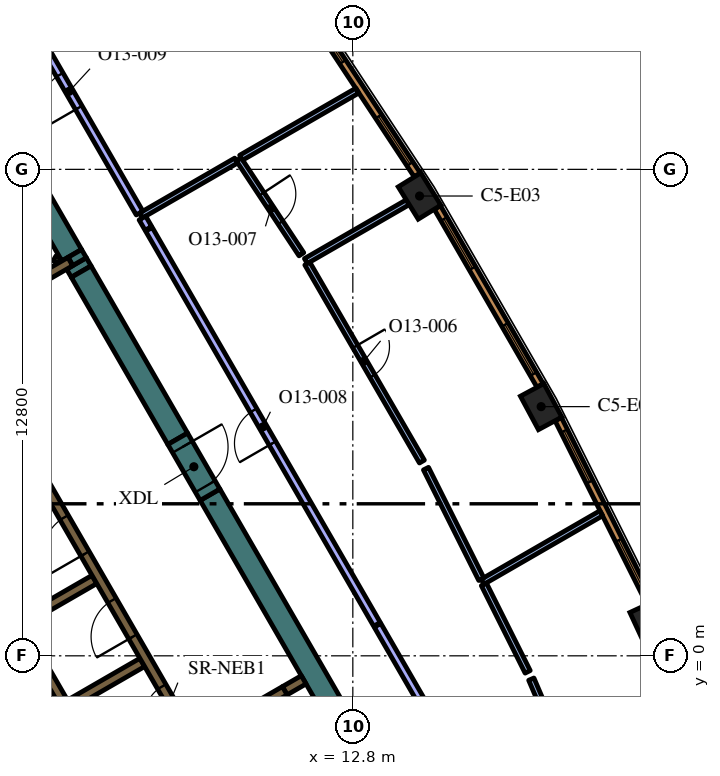
"""IFC4 building model, lengths in metres.
Left out: names, types, materials, properties, quantities, classifications, styles, units other than length and angle.
Written with IfcOpenShell. Run it as: python <this file> out.ifc"""

import sys

from ifc_helpers import new_model, si_unit, direction, frame, frame_2d, origin, origin_2d, place, context, subcontext, project, spatial, polyline, rectangle, outline, extrude, element, fill, save


model = new_model("IFC4")
c1 = context("Model", 3, precision=1e-05, world=origin(), true_north=direction((0.0, 1.0)))
c2 = subcontext(c1, "Body", "Model", "MODEL_VIEW")
j1 = project(units=[si_unit("LENGTHUNIT", "METRE"), si_unit("PLANEANGLEUNIT", "RADIAN")], contexts=[c1])
p1 = place(None, origin())
s1 = spatial("IfcSite", under=j1, at=p1, CompositionType="ELEMENT")
p2 = place(p1, origin())
s2 = spatial("IfcBuilding", under=s1, at=p2, CompositionType="ELEMENT")
p3 = place(p2, frame((0.0, 0.0, 300.6)))
s3 = spatial("IfcBuildingStorey", under=s2, at=p3, CompositionType="ELEMENT", Elevation=300.6)
for number, where, z_axis, x_axis in (
    (1, (20.619, 0.834, 0.0), (0.0, 0.0, 1.0), (-0.421, 0.907, 0.0)),
    (2, (17.756, 6.557, 0.0), (0.0, 0.0, 1.0), (-0.474, 0.881, 0.0)),
    (3, (14.556, 12.098, 0.0), (0.0, 0.0, 1.0), (-0.526, 0.851, 0.0)),
):
    element("IfcColumn", number, at=place(p3, frame(where, z_axis=z_axis, x_axis=x_axis)), inside=s3, PredefinedType="COLUMN", context=c2, shape_type="SweptSolid", body=[
        extrude(rectangle(XDim=1.0, YDim=0.7, at=origin_2d()), origin(), (0.0, 0.0, 1.0), 4.2),
    ])
p4 = place(p3, frame((9.042, 4.239, 0.0), z_axis=(0.0, 0.0, 1.0), x_axis=(0.500005785455, -0.866022063525, 0.0)))
e4 = element("IfcWall", 4, at=p4, inside=s3, PredefinedType="SOLIDWALL", context=c2, shape_type="SweptSolid", body=[
    extrude(rectangle(XDim=12.406, YDim=0.6, at=frame_2d((6.203, 0.0))), origin(), (0.0, 0.0, 1.0), 4.2),
])
p5 = place(p3, frame((5.529, 10.324, 0.0), z_axis=(0.0, 0.0, 1.0), x_axis=(0.499122205112, -0.866531606097, 0.0)))
e5 = element("IfcWall", 5, at=p5, inside=s3, PredefinedType="SOLIDWALL", context=c2, shape_type="SweptSolid", body=[
    extrude(rectangle(XDim=0.247, YDim=0.6, at=frame_2d((0.123, 0.0))), origin(), (0.0, 0.0, 1.0), 4.2),
])
p6 = place(p3, frame((1.989, 16.456, 0.0), z_axis=(0.0, 0.0, 1.0), x_axis=(0.499973159588, -0.866040899549, 0.0)))
e6 = element("IfcWall", 6, at=p6, inside=s3, PredefinedType="SOLIDWALL", context=c2, shape_type="SweptSolid", body=[
    extrude(rectangle(XDim=6.828, YDim=0.6, at=frame_2d((3.414, 0.0))), origin(), (0.0, 0.0, 1.0), 4.2),
])
p7 = place(p3, origin())
e7 = element("IfcWall", 7, at=p7, inside=s3, PredefinedType="SOLIDWALL", context=c2, shape_type="SweptSolid", body=[
    extrude(outline(polyline([(5.664, 10.691), (5.788, 10.476), (5.432, 10.271), (5.308, 10.486), (5.664, 10.691)])), origin(), (0.0, 0.0, 1.0), 4.2),
])
p8 = place(p3, frame((8.192, 5.711, 0.0), z_axis=(0.0, 0.0, 1.0), x_axis=(-0.500006836656, 0.866021456604, 0.0)))
e8 = element("IfcWall", 8, at=p8, inside=s3, PredefinedType="SOLIDWALL", context=c2, shape_type="SweptSolid", body=[
    extrude(rectangle(XDim=5.078, YDim=0.6, at=frame_2d((2.539, 0.0))), origin(), (0.0, 0.0, 1.0), 4.2),
])
p9 = place(p3, frame((11.507, -0.631, 0.0), z_axis=(0.0, 0.0, 1.0), x_axis=(-0.866093731455, -0.499881634324, 0.0)))
e9 = element("IfcWall", 9, at=p9, inside=s3, PredefinedType="SOLIDWALL", context=c2, shape_type="SweptSolid", body=[
    extrude(rectangle(XDim=0.575, YDim=0.25, at=frame_2d((0.288, 0.0))), origin(), (0.0, 0.0, 1.0), 4.2),
])
p10 = place(p3, frame((5.97, -2.591, 0.0), z_axis=(0.0, 0.0, 1.0), x_axis=(-0.499994469932, 0.866028596547, 0.0)))
e10 = element("IfcWall", 10, at=p10, inside=s3, PredefinedType="SOLIDWALL", context=c2, shape_type="SweptSolid", body=[
    extrude(rectangle(XDim=10.488, YDim=0.25, at=frame_2d((5.244, 0.0))), origin(), (0.0, 0.0, 1.0), 4.2),
])
for number, where, z_axis, x_axis in (
    (11, (4.094, 0.909, 0.0), (0.0, 0.0, 1.0), (0.866, 0.5, 0.0)),
    (12, (5.354, -1.274, 0.0), (0.0, 0.0, 1.0), (0.866, 0.5, 0.0)),
):
    element("IfcWall", number, at=place(p3, frame(where, z_axis=z_axis, x_axis=x_axis)), inside=s3, PredefinedType="SOLIDWALL", context=c2, shape_type="SweptSolid", body=[
        extrude(rectangle(XDim=2.2, YDim=0.25, at=frame_2d((1.1, 0.0))), origin(), (0.0, 0.0, 1.0), 4.2),
    ])
p11 = place(p3, frame((4.98, 10.358, 0.0), z_axis=(0.0, 0.0, 1.0), x_axis=(0.500640202437, 0.86565546709, 0.0)))
e13 = element("IfcWall", 13, at=p11, inside=s3, PredefinedType="PARTITIONING", context=c2, shape_type="SweptSolid", body=[
    extrude(rectangle(XDim=0.146, YDim=0.15, at=frame_2d((0.073, 0.0))), origin(), (0.0, 0.0, 1.0), 3.55),
])
p12 = place(p3, frame((8.565, -2.185, 0.0), z_axis=(0.0, 0.0, 1.0), x_axis=(-0.499997954832, 0.866026584559, 0.0)))
e14 = element("IfcWall", 14, at=p12, inside=s3, PredefinedType="SOLIDWALL", context=c2, shape_type="SweptSolid", body=[
    extrude(rectangle(XDim=12.35, YDim=0.25, at=frame_2d((6.175, 0.0))), origin(), (0.0, 0.0, 1.0), 4.2),
])
p13 = place(p12, frame((0.685, 0.0, 0.0)))
e15 = element("IfcOpeningElement", 15, at=p13, cuts=e14, PredefinedType="OPENING", context=c2, shape_type="SweptSolid", body=[
    extrude(rectangle(XDim=0.9, YDim=2.1, at=frame_2d((0.45, 1.05))), frame((0.0, 0.135, 0.0), z_axis=(0.0, -1.0, 0.0), x_axis=(1.0, 0.0, 0.0)), (0.0, 0.0, 1.0), 0.27),
])
p14 = place(p12, frame((3.105, 0.0, 0.0)))
e16 = element("IfcOpeningElement", 16, at=p14, cuts=e14, PredefinedType="OPENING", context=c2, shape_type="SweptSolid", body=[
    extrude(rectangle(XDim=1.1, YDim=2.1, at=frame_2d((0.55, 1.05))), frame((0.0, 0.135, 0.0), z_axis=(0.0, -1.0, 0.0), x_axis=(1.0, 0.0, 0.0)), (0.0, 0.0, 1.0), 0.27),
])
p15 = place(p12, frame((5.625, 0.0, 0.0)))
e17 = element("IfcOpeningElement", 17, at=p15, cuts=e14, PredefinedType="OPENING", context=c2, shape_type="SweptSolid", body=[
    extrude(rectangle(XDim=1.1, YDim=2.1, at=frame_2d((0.55, 1.05))), frame((0.0, 0.135, 0.0), z_axis=(0.0, -1.0, 0.0), x_axis=(1.0, 0.0, 0.0)), (0.0, 0.0, 1.0), 0.27),
])
p16 = place(p12, frame((8.145, 0.0, 0.0)))
e18 = element("IfcOpeningElement", 18, at=p16, cuts=e14, PredefinedType="OPENING", context=c2, shape_type="SweptSolid", body=[
    extrude(rectangle(XDim=1.1, YDim=2.1, at=frame_2d((0.55, 1.05))), frame((0.0, 0.135, 0.0), z_axis=(0.0, -1.0, 0.0), x_axis=(1.0, 0.0, 0.0)), (0.0, 0.0, 1.0), 0.27),
])
p17 = place(p12, frame((10.665, 0.0, 0.0)))
e19 = element("IfcOpeningElement", 19, at=p17, cuts=e14, PredefinedType="OPENING", context=c2, shape_type="SweptSolid", body=[
    extrude(rectangle(XDim=1.1, YDim=2.1, at=frame_2d((0.55, 1.05))), frame((0.0, 0.135, 0.0), z_axis=(0.0, -1.0, 0.0), x_axis=(1.0, 0.0, 0.0)), (0.0, 0.0, 1.0), 0.27),
])
p18 = place(p3, frame((5.366, 10.373, 0.0), z_axis=(0.0, 0.0, 1.0), x_axis=(-0.866019956843, -0.50000943426, 0.0)))
e20 = element("IfcWall", 20, at=p18, inside=s3, PredefinedType="SOLIDWALL", context=c2, shape_type="SweptSolid", body=[
    extrude(rectangle(XDim=2.7, YDim=0.25, at=frame_2d((1.35, 0.0))), origin(), (0.0, 0.0, 1.0), 4.2),
])
p19 = place(p18, frame((1.45, 0.0, 0.0)))
e21 = element("IfcOpeningElement", 21, at=p19, cuts=e20, PredefinedType="OPENING", context=c2, shape_type="SweptSolid", body=[
    extrude(rectangle(XDim=0.9, YDim=2.1, at=frame_2d((0.45, 1.05))), frame((0.0, 0.135, 0.0), z_axis=(0.0, -1.0, 0.0), x_axis=(1.0, 0.0, 0.0)), (0.0, 0.0, 1.0), 0.27),
])
p20 = place(p3, frame((11.009, -0.919, 0.0), z_axis=(0.0, 0.0, 1.0), x_axis=(-0.866059744384, -0.49994051562, 0.0)))
e22 = element("IfcWall", 22, at=p20, inside=s3, PredefinedType="SOLIDWALL", context=c2, shape_type="SweptSolid", body=[
    extrude(rectangle(XDim=2.1, YDim=0.25, at=frame_2d((1.05, 0.0))), origin(), (0.0, 0.0, 1.0), 4.2),
])
p21 = place(p20, frame((0.45, 0.0, 0.0)))
e23 = element("IfcOpeningElement", 23, at=p21, cuts=e22, PredefinedType="OPENING", context=c2, shape_type="SweptSolid", body=[
    extrude(rectangle(XDim=1.2, YDim=2.1, at=frame_2d((0.6, 1.05))), frame((0.0, 0.135, 0.0), z_axis=(0.0, -1.0, 0.0), x_axis=(1.0, 0.0, 0.0)), (0.0, 0.0, 1.0), 0.27),
])
p22 = place(p3, frame((8.192, 5.711, 0.0), z_axis=(0.0, 0.0, 1.0), x_axis=(0.500062241894, -0.865989465428, 0.0)))
e24 = element("IfcWall", 24, at=p22, inside=s3, PredefinedType="SOLIDWALL", context=c2, shape_type="SweptSolid", body=[
    extrude(rectangle(XDim=1.7, YDim=0.6, at=frame_2d((0.85, 0.0))), origin(), (0.0, 0.0, 1.0), 4.2),
])
p23 = place(p22, frame((0.25, 0.0, 0.0)))
e25 = element("IfcOpeningElement", 25, at=p23, cuts=e24, PredefinedType="OPENING", context=c2, shape_type="SweptSolid", body=[
    extrude(rectangle(XDim=1.2, YDim=2.1, at=frame_2d((0.6, 1.05))), frame((0.0, 0.31, 0.0), z_axis=(0.0, -1.0, 0.0), x_axis=(1.0, 0.0, 0.0)), (0.0, 0.0, 1.0), 0.62),
])
p24 = place(p3, frame((16.215, 1.948, 0.0), z_axis=(0.0, 0.0, 1.0), x_axis=(0.866026634742, 0.499997867913, 0.0)))
e26 = element("IfcWall", 26, at=p24, inside=s3, PredefinedType="PARTITIONING", context=c2, shape_type="SweptSolid", body=[
    extrude(rectangle(XDim=3.606, YDim=0.15, at=frame_2d((1.803, 0.0))), origin(), (0.0, 0.0, 1.0), 3.55),
])
p25 = place(p3, frame((17.497, -0.613, 0.0), z_axis=(0.0, 0.0, 1.0), x_axis=(0.393381340755, -0.919375397075, 0.0)))
e27 = element("IfcWall", 27, at=p25, inside=s3, PredefinedType="PARTITIONING", context=c2, shape_type="SweptSolid", body=[
    extrude(rectangle(XDim=5.368, YDim=0.15, at=frame_2d((2.684, 0.0))), origin(), (0.0, 0.0, 1.0), 3.55),
])
p26 = place(p25, frame((2.268, 0.0, 0.0)))
e28 = element("IfcOpeningElement", 28, at=p26, cuts=e27, PredefinedType="OPENING", context=c2, shape_type="SweptSolid", body=[
    extrude(rectangle(XDim=0.9, YDim=2.1, at=frame_2d((0.45, 1.05))), frame((0.0, 0.085, 0.0), z_axis=(0.0, -1.0, 0.0), x_axis=(1.0, 0.0, 0.0)), (0.0, 0.0, 1.0), 0.17),
])
p27 = place(p3, frame((17.401, -0.422, 0.0), z_axis=(0.0, 0.0, 1.0), x_axis=(-0.447479029466, 0.894294424778, 0.0)))
e29 = element("IfcWall", 29, at=p27, inside=s3, PredefinedType="PARTITIONING", context=c2, shape_type="SweptSolid", body=[
    extrude(rectangle(XDim=2.575, YDim=0.15, at=frame_2d((1.288, 0.0))), origin(), (0.0, 0.0, 1.0), 3.55),
])
p28 = place(p3, frame((11.564, 10.387, 0.0), z_axis=(0.0, 0.0, 1.0), x_axis=(0.86604641216, 0.499963610661, 0.0)))
e30 = element("IfcWall", 30, at=p28, inside=s3, PredefinedType="PARTITIONING", context=c2, shape_type="SweptSolid", body=[
    extrude(rectangle(XDim=3.096, YDim=0.15, at=frame_2d((1.548, 0.0))), origin(), (0.0, 0.0, 1.0), 3.55),
])
p29 = place(p3, frame((16.181, 2.015, 0.0), z_axis=(0.0, 0.0, 1.0), x_axis=(-0.447513663313, 0.894277094165, 0.0)))
e31 = element("IfcWall", 31, at=p29, inside=s3, PredefinedType="PARTITIONING", context=c2, shape_type="SweptSolid", body=[
    extrude(rectangle(XDim=3.254, YDim=0.15, at=frame_2d((1.627, 0.0))), origin(), (0.0, 0.0, 1.0), 3.55),
])
p30 = place(p3, frame((11.602, 10.322, 0.0), z_axis=(0.0, 0.0, 1.0), x_axis=(0.500961140821, -0.865469777281, 0.0)))
e32 = element("IfcWall", 32, at=p30, inside=s3, PredefinedType="PARTITIONING", context=c2, shape_type="SweptSolid", body=[
    extrude(rectangle(XDim=6.021, YDim=0.15, at=frame_2d((3.01, 0.0))), origin(), (0.0, 0.0, 1.0), 3.55),
])
p31 = place(p30, frame((2.521, 0.0, 0.0)))
e33 = element("IfcOpeningElement", 33, at=p31, cuts=e32, PredefinedType="OPENING", context=c2, shape_type="SweptSolid", body=[
    extrude(rectangle(XDim=0.9, YDim=2.1, at=frame_2d((0.45, 1.05))), frame((0.0, 0.085, 0.0), z_axis=(0.0, -1.0, 0.0), x_axis=(1.0, 0.0, 0.0)), (0.0, 0.0, 1.0), 0.17),
])
p32 = place(p3, frame((9.795, 13.068, 0.0), z_axis=(0.0, 0.0, 1.0), x_axis=(0.550767347659, -0.834658809786, 0.0)))
e34 = element("IfcWall", 34, at=p32, inside=s3, PredefinedType="PARTITIONING", context=c2, shape_type="SweptSolid", body=[
    extrude(rectangle(XDim=2.999, YDim=0.15, at=frame_2d((1.5, 0.0))), origin(), (0.0, 0.0, 1.0), 3.55),
])
p33 = place(p32, frame((1.099, 0.0, 0.0)))
e35 = element("IfcOpeningElement", 35, at=p33, cuts=e34, PredefinedType="OPENING", context=c2, shape_type="SweptSolid", body=[
    extrude(rectangle(XDim=0.9, YDim=2.1, at=frame_2d((0.45, 1.05))), frame((0.0, 0.085, 0.0), z_axis=(0.0, -1.0, 0.0), x_axis=(1.0, 0.0, 0.0)), (0.0, 0.0, 1.0), 0.17),
])
p34 = place(p3, frame((9.86, 13.106, 0.0), z_axis=(0.0, 0.0, 1.0), x_axis=(0.866022094817, 0.500005731256, 0.0)))
e36 = element("IfcWall", 36, at=p34, inside=s3, PredefinedType="PARTITIONING", context=c2, shape_type="SweptSolid", body=[
    extrude(rectangle(XDim=3.531, YDim=0.15, at=frame_2d((1.766, 0.0))), origin(), (0.0, 0.0, 1.0), 3.55),
])
p35 = place(p3, frame((7.226, 11.585, 0.0), z_axis=(0.0, 0.0, 1.0), x_axis=(0.866021079084, 0.500007490527, 0.0)))
e37 = element("IfcWall", 37, at=p35, inside=s3, PredefinedType="PARTITIONING", context=c2, shape_type="SweptSolid", body=[
    extrude(rectangle(XDim=2.892, YDim=0.15, at=frame_2d((1.446, 0.0))), origin(), (0.0, 0.0, 1.0), 3.55),
])
p36 = place(p3, frame((13.436, 0.829, 0.0), z_axis=(0.0, 0.0, 1.0), x_axis=(-0.49999894854, 0.866026010844, 0.0)))
e38 = element("IfcWall", 38, at=p36, inside=s3, PredefinedType="PARTITIONING", context=c2, shape_type="SweptSolid", body=[
    extrude(rectangle(XDim=12.0, YDim=0.2, at=frame_2d((6.0, 0.0))), origin(), (0.0, 0.0, 1.0), 3.55),
])
p37 = place(p36, frame((5.5, 0.0, 0.0)))
e39 = element("IfcOpeningElement", 39, at=p37, cuts=e38, PredefinedType="OPENING", context=c2, shape_type="SweptSolid", body=[
    extrude(rectangle(XDim=1.0, YDim=2.1, at=frame_2d((0.5, 1.05))), frame((0.0, 0.11, 0.0), z_axis=(0.0, -1.0, 0.0), x_axis=(1.0, 0.0, 0.0)), (0.0, 0.0, 1.0), 0.22),
])
p38 = place(p3, frame((7.421, 11.247, 0.0), z_axis=(0.0, 0.0, 1.0), x_axis=(-0.500303403544, 0.865850162789, 0.0)))
e40 = element("IfcWall", 40, at=p38, inside=s3, PredefinedType="PARTITIONING", context=c2, shape_type="SweptSolid", body=[
    extrude(rectangle(XDim=0.315, YDim=0.2, at=frame_2d((0.158, 0.0))), origin(), (0.0, 0.0, 1.0), 3.55),
])
p39 = place(p3, frame((17.565, -6.324, 0.0), z_axis=(0.0, 0.0, 1.0), x_axis=(-0.499977548053, 0.866038366034, 0.0)))
e41 = element("IfcWall", 41, at=p39, inside=s3, PredefinedType="PARTITIONING", context=c2, shape_type="SweptSolid", body=[
    extrude(rectangle(XDim=8.229, YDim=0.2, at=frame_2d((4.115, 0.0))), origin(), (0.0, 0.0, 1.0), 3.55),
])
p40 = place(p3, frame((7.188, 11.65, 0.0), z_axis=(0.0, 0.0, 1.0), x_axis=(-0.499989634868, 0.866031388014, 0.0)))
e42 = element("IfcWall", 42, at=p40, inside=s3, PredefinedType="PARTITIONING", context=c2, shape_type="SweptSolid", body=[
    extrude(rectangle(XDim=7.303, YDim=0.2, at=frame_2d((3.652, 0.0))), origin(), (0.0, 0.0, 1.0), 3.55),
])
p41 = place(p40, frame((3.2, 0.0, 0.0)))
e43 = element("IfcOpeningElement", 43, at=p41, cuts=e42, PredefinedType="OPENING", context=c2, shape_type="SweptSolid", body=[
    extrude(rectangle(XDim=1.0, YDim=2.1, at=frame_2d((0.5, 1.05))), frame((0.0, 0.11, 0.0), z_axis=(0.0, -1.0, 0.0), x_axis=(1.0, 0.0, 0.0)), (0.0, 0.0, 1.0), 0.22),
])
p42 = place(p3, frame((20.625, 1.392, 0.0), z_axis=(0.0, 0.0, 1.0), x_axis=(-0.447484531401, 0.894291671747, 0.0)))
e44 = element("IfcWall", 44, at=p42, inside=s3, PredefinedType="SOLIDWALL", context=c2, shape_type="SweptSolid", body=[
    extrude(rectangle(XDim=5.406, YDim=0.19, at=frame_2d((2.703, 0.0))), origin(), (0.0, 0.0, 1.0), 3.95),
])
p43 = place(p42, frame((0.346, 0.0, 0.6)))
e45 = element("IfcOpeningElement", 45, at=p43, cuts=e44, PredefinedType="OPENING", context=c2, shape_type="SweptSolid", body=[
    extrude(rectangle(XDim=1.5, YDim=2.85, at=frame_2d((0.75, 1.425))), frame((0.0, 0.105, 0.0), z_axis=(0.0, -1.0, 0.0), x_axis=(1.0, 0.0, 0.0)), (0.0, 0.0, 1.0), 0.21),
])
p44 = place(p42, frame((3.559, 0.0, 0.6)))
e46 = element("IfcOpeningElement", 46, at=p44, cuts=e44, PredefinedType="OPENING", context=c2, shape_type="SweptSolid", body=[
    extrude(rectangle(XDim=1.5, YDim=2.85, at=frame_2d((0.75, 1.425))), frame((0.0, 0.105, 0.0), z_axis=(0.0, -1.0, 0.0), x_axis=(1.0, 0.0, 0.0)), (0.0, 0.0, 1.0), 0.21),
])
p45 = place(p3, frame((17.728, 7.114, 0.0), z_axis=(0.0, 0.0, 1.0), x_axis=(-0.500024767483, 0.866011103799, 0.0)))
e47 = element("IfcWall", 47, at=p45, inside=s3, PredefinedType="SOLIDWALL", context=c2, shape_type="SweptSolid", body=[
    extrude(rectangle(XDim=5.406, YDim=0.19, at=frame_2d((2.703, 0.0))), origin(), (0.0, 0.0, 1.0), 3.95),
])
p46 = place(p45, frame((0.346, 0.0, 0.6)))
e48 = element("IfcOpeningElement", 48, at=p46, cuts=e47, PredefinedType="OPENING", context=c2, shape_type="SweptSolid", body=[
    extrude(rectangle(XDim=1.5, YDim=2.85, at=frame_2d((0.75, 1.425))), frame((0.0, 0.105, 0.0), z_axis=(0.0, -1.0, 0.0), x_axis=(1.0, 0.0, 0.0)), (0.0, 0.0, 1.0), 0.21),
])
p47 = place(p45, frame((3.56, 0.0, 0.6)))
e49 = element("IfcOpeningElement", 49, at=p47, cuts=e47, PredefinedType="OPENING", context=c2, shape_type="SweptSolid", body=[
    extrude(rectangle(XDim=1.5, YDim=2.85, at=frame_2d((0.75, 1.425))), frame((0.0, 0.105, 0.0), z_axis=(0.0, -1.0, 0.0), x_axis=(1.0, 0.0, 0.0)), (0.0, 0.0, 1.0), 0.21),
])
p48 = place(p3, frame((14.496, 12.653, 0.0), z_axis=(0.0, 0.0, 1.0), x_axis=(-0.550744054781, 0.83467417962, 0.0)))
e50 = element("IfcWall", 50, at=p48, inside=s3, PredefinedType="SOLIDWALL", context=c2, shape_type="SweptSolid", body=[
    extrude(rectangle(XDim=5.406, YDim=0.19, at=frame_2d((2.703, 0.0))), origin(), (0.0, 0.0, 1.0), 3.95),
])
p49 = place(p48, frame((0.346, 0.0, 0.6)))
e51 = element("IfcOpeningElement", 51, at=p49, cuts=e50, PredefinedType="OPENING", context=c2, shape_type="SweptSolid", body=[
    extrude(rectangle(XDim=1.5, YDim=2.85, at=frame_2d((0.75, 1.425))), frame((0.0, 0.105, 0.0), z_axis=(0.0, -1.0, 0.0), x_axis=(1.0, 0.0, 0.0)), (0.0, 0.0, 1.0), 0.21),
])
p50 = place(p48, frame((3.559, 0.0, 0.6)))
e52 = element("IfcOpeningElement", 52, at=p50, cuts=e50, PredefinedType="OPENING", context=c2, shape_type="SweptSolid", body=[
    extrude(rectangle(XDim=1.5, YDim=2.85, at=frame_2d((0.75, 1.425))), frame((0.0, 0.105, 0.0), z_axis=(0.0, -1.0, 0.0), x_axis=(1.0, 0.0, 0.0)), (0.0, 0.0, 1.0), 0.21),
])
p51 = place(p13, origin())
e53 = element("IfcDoor", 53, at=p51, inside=s3, OperationType="SINGLE_SWING_LEFT", PredefinedType="DOOR", context=c2, shape_type="SweptSolid", body=[
    extrude(rectangle(XDim=0.9, YDim=2.1, at=frame_2d((0.45, 1.05))), frame((0.0, 0.025, 0.0), z_axis=(0.0, -1.0, 0.0), x_axis=(1.0, 0.0, 0.0)), (0.0, 0.0, 1.0), 0.05),
])
fill(e15, e53)
p52 = place(p14, origin())
e54 = element("IfcDoor", 54, at=p52, inside=s3, OperationType="DOUBLE_DOOR_SLIDING", PredefinedType="DOOR", context=c2, shape_type="SweptSolid", body=[
    extrude(rectangle(XDim=1.1, YDim=2.1, at=frame_2d((0.55, 1.05))), frame((0.0, 0.025, 0.0), z_axis=(0.0, -1.0, 0.0), x_axis=(1.0, 0.0, 0.0)), (0.0, 0.0, 1.0), 0.05),
])
fill(e16, e54)
p53 = place(p15, origin())
e55 = element("IfcDoor", 55, at=p53, inside=s3, OperationType="DOUBLE_DOOR_SLIDING", PredefinedType="DOOR", context=c2, shape_type="SweptSolid", body=[
    extrude(rectangle(XDim=1.1, YDim=2.1, at=frame_2d((0.55, 1.05))), frame((0.0, 0.025, 0.0), z_axis=(0.0, -1.0, 0.0), x_axis=(1.0, 0.0, 0.0)), (0.0, 0.0, 1.0), 0.05),
])
fill(e17, e55)
p54 = place(p23, origin())
e56 = element("IfcDoor", 56, at=p54, inside=s3, OperationType="SINGLE_SWING_LEFT", PredefinedType="DOOR", context=c2, shape_type="SweptSolid", body=[
    extrude(rectangle(XDim=1.2, YDim=2.1, at=frame_2d((0.6, 1.05))), frame((0.0, 0.025, 0.0), z_axis=(0.0, -1.0, 0.0), x_axis=(1.0, 0.0, 0.0)), (0.0, 0.0, 1.0), 0.05),
])
fill(e25, e56)
p55 = place(p31, origin())
e57 = element("IfcDoor", 57, at=p55, inside=s3, OperationType="SINGLE_SWING_LEFT", PredefinedType="DOOR", context=c2, shape_type="SweptSolid", body=[
    extrude(rectangle(XDim=0.9, YDim=2.1, at=frame_2d((0.45, 1.05))), frame((0.0, 0.025, 0.0), z_axis=(0.0, -1.0, 0.0), x_axis=(1.0, 0.0, 0.0)), (0.0, 0.0, 1.0), 0.05),
])
fill(e33, e57)
p56 = place(p33, origin())
e58 = element("IfcDoor", 58, at=p56, inside=s3, OperationType="SINGLE_SWING_RIGHT", PredefinedType="DOOR", context=c2, shape_type="SweptSolid", body=[
    extrude(rectangle(XDim=0.9, YDim=2.1, at=frame_2d((0.45, 1.05))), frame((0.0, 0.025, 0.0), z_axis=(0.0, -1.0, 0.0), x_axis=(1.0, 0.0, 0.0)), (0.0, 0.0, 1.0), 0.05),
])
fill(e35, e58)
p57 = place(p37, origin())
e59 = element("IfcDoor", 59, at=p57, inside=s3, OperationType="SINGLE_SWING_RIGHT", PredefinedType="DOOR", context=c2, shape_type="SweptSolid", body=[
    extrude(rectangle(XDim=1.0, YDim=2.1, at=frame_2d((0.5, 1.05))), frame((0.0, 0.025, 0.0), z_axis=(0.0, -1.0, 0.0), x_axis=(1.0, 0.0, 0.0)), (0.0, 0.0, 1.0), 0.05),
])
fill(e39, e59)
p58 = place(p41, origin())
e60 = element("IfcDoor", 60, at=p58, inside=s3, OperationType="SINGLE_SWING_RIGHT", PredefinedType="DOOR", context=c2, shape_type="SweptSolid", body=[
    extrude(rectangle(XDim=1.0, YDim=2.1, at=frame_2d((0.5, 1.05))), frame((0.0, 0.025, 0.0), z_axis=(0.0, -1.0, 0.0), x_axis=(1.0, 0.0, 0.0)), (0.0, 0.0, 1.0), 0.05),
])
fill(e43, e60)
p59 = place(p43, origin())
e61 = element("IfcWindow", 61, at=p59, inside=s3, PartitioningType="SINGLE_PANEL", PredefinedType="WINDOW", context=c2, shape_type="SweptSolid", body=[
    extrude(rectangle(XDim=1.5, YDim=2.85, at=frame_2d((0.75, 1.425))), frame((0.0, 0.045, 0.0), z_axis=(0.0, -1.0, 0.0), x_axis=(1.0, 0.0, 0.0)), (0.0, 0.0, 1.0), 0.06),
])
fill(e45, e61)
p60 = place(p44, origin())
e62 = element("IfcWindow", 62, at=p60, inside=s3, PartitioningType="SINGLE_PANEL", PredefinedType="WINDOW", context=c2, shape_type="SweptSolid", body=[
    extrude(rectangle(XDim=1.5, YDim=2.85, at=frame_2d((0.75, 1.425))), frame((0.0, 0.045, 0.0), z_axis=(0.0, -1.0, 0.0), x_axis=(1.0, 0.0, 0.0)), (0.0, 0.0, 1.0), 0.06),
])
fill(e46, e62)
p61 = place(p46, origin())
e63 = element("IfcWindow", 63, at=p61, inside=s3, PartitioningType="SINGLE_PANEL", PredefinedType="WINDOW", context=c2, shape_type="SweptSolid", body=[
    extrude(rectangle(XDim=1.5, YDim=2.85, at=frame_2d((0.75, 1.425))), frame((0.0, 0.045, 0.0), z_axis=(0.0, -1.0, 0.0), x_axis=(1.0, 0.0, 0.0)), (0.0, 0.0, 1.0), 0.06),
])
fill(e48, e63)
p62 = place(p47, origin())
e64 = element("IfcWindow", 64, at=p62, inside=s3, PartitioningType="SINGLE_PANEL", PredefinedType="WINDOW", context=c2, shape_type="SweptSolid", body=[
    extrude(rectangle(XDim=1.5, YDim=2.85, at=frame_2d((0.75, 1.425))), frame((0.0, 0.045, 0.0), z_axis=(0.0, -1.0, 0.0), x_axis=(1.0, 0.0, 0.0)), (0.0, 0.0, 1.0), 0.06),
])
fill(e49, e64)
p63 = place(p49, origin())
e65 = element("IfcWindow", 65, at=p63, inside=s3, PartitioningType="SINGLE_PANEL", PredefinedType="WINDOW", context=c2, shape_type="SweptSolid", body=[
    extrude(rectangle(XDim=1.5, YDim=2.85, at=frame_2d((0.75, 1.425))), frame((0.0, 0.045, 0.0), z_axis=(0.0, -1.0, 0.0), x_axis=(1.0, 0.0, 0.0)), (0.0, 0.0, 1.0), 0.06),
])
fill(e51, e65)
p64 = place(p50, origin())
e66 = element("IfcWindow", 66, at=p64, inside=s3, PartitioningType="SINGLE_PANEL", PredefinedType="WINDOW", context=c2, shape_type="SweptSolid", body=[
    extrude(rectangle(XDim=1.5, YDim=2.85, at=frame_2d((0.75, 1.425))), frame((0.0, 0.045, 0.0), z_axis=(0.0, -1.0, 0.0), x_axis=(1.0, 0.0, 0.0)), (0.0, 0.0, 1.0), 0.06),
])
fill(e52, e66)
save(model, sys.argv[1])
